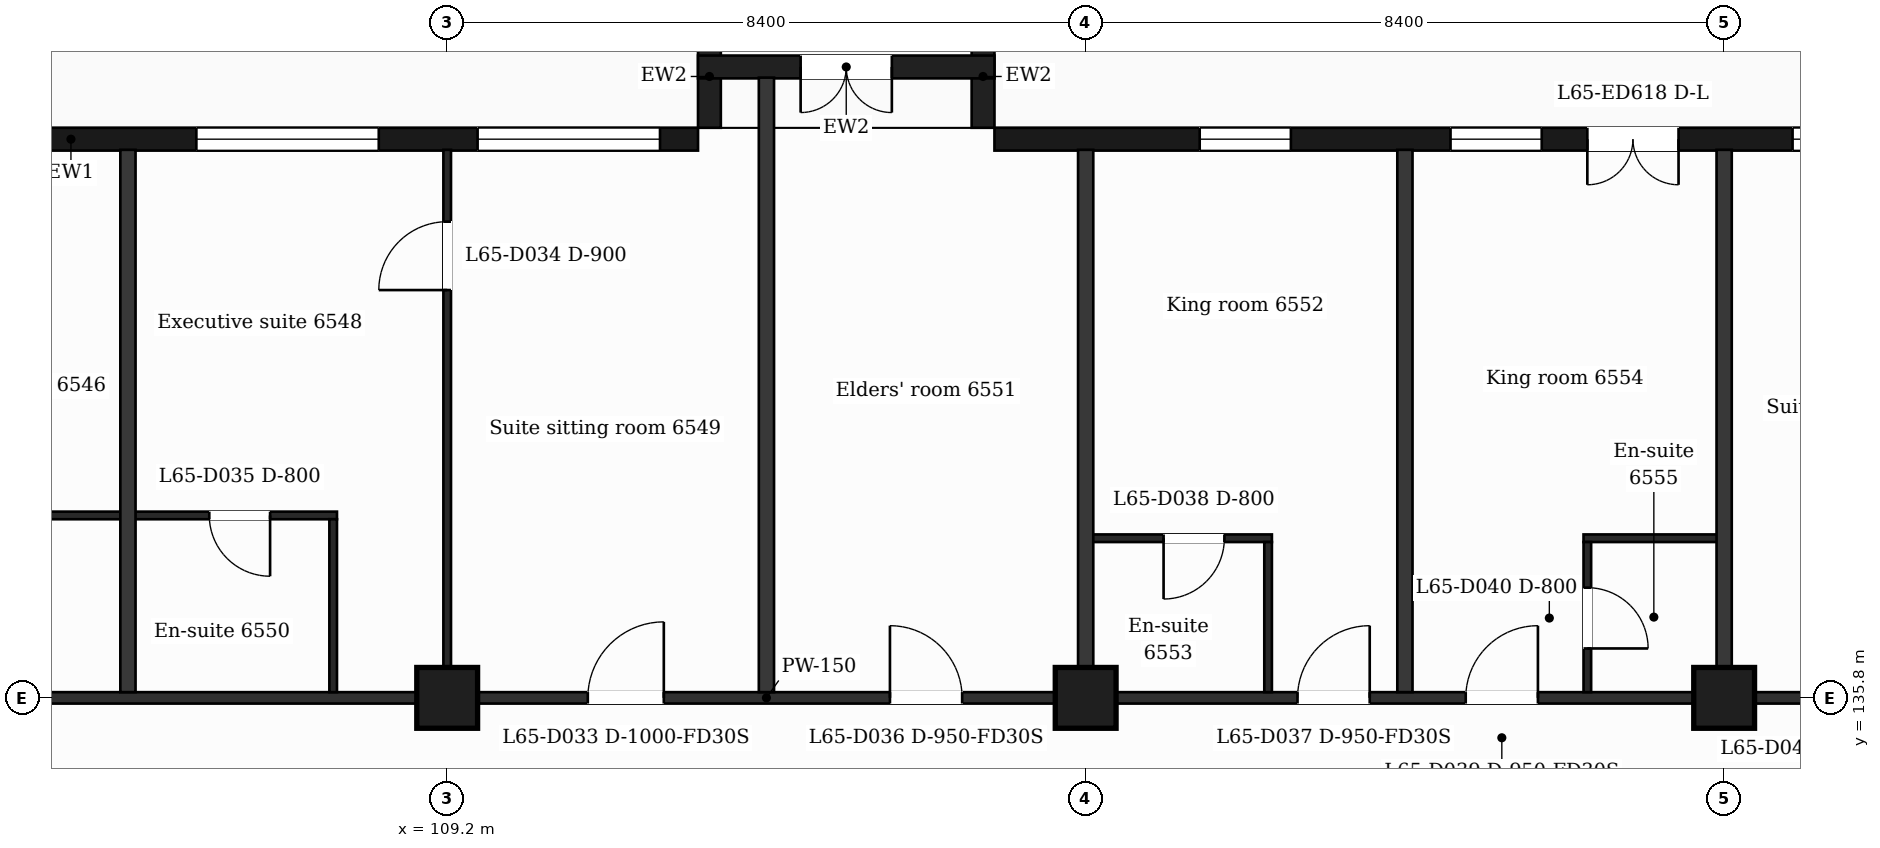
"""IFC4 building model, lengths in metres.
Left out: names, types, materials, properties, quantities, classifications, styles, units other than length and angle.
Written with IfcOpenShell. Run it as: python <this file> out.ifc"""

import sys

from ifc_helpers import new_model, si_unit, direction, frame, frame_2d, origin, origin_2d, place, context, subcontext, project, spatial, rectangle, extrude, element, fill, save


model = new_model("IFC4")
c1 = context("Model", 3, precision=1e-05, world=origin(), true_north=direction((0.0, 1.0)))
c2 = subcontext(c1, "Body", "Model", "MODEL_VIEW")
j1 = project(units=[si_unit("LENGTHUNIT", "METRE"), si_unit("PLANEANGLEUNIT", "RADIAN")], contexts=[c1])
p1 = place(None, origin())
s1 = spatial("IfcSite", under=j1, at=p1, CompositionType="ELEMENT")
p2 = place(p1, origin())
s2 = spatial("IfcBuilding", under=s1, at=p2, CompositionType="ELEMENT")
p3 = place(p2, frame((0.0, 0.0, 270.1)))
s3 = spatial("IfcBuildingStorey", under=s2, at=p3, CompositionType="ELEMENT", Elevation=270.1)
for number, where, z_axis, x_axis in (
    (1, (109.2, 135.8, 0.0), (0.0, 0.0, 1.0), (1.0, 0.0, 0.0)),
    (2, (117.6, 135.8, 0.0), (0.0, 0.0, 1.0), (1.0, 0.0, 0.0)),
    (3, (126.0, 135.8, 0.0), (0.0, 0.0, 1.0), (1.0, 0.0, 0.0)),
):
    element("IfcColumn", number, at=place(p3, frame(where, z_axis=z_axis, x_axis=x_axis)), inside=s3, PredefinedType="COLUMN", context=c2, shape_type="SweptSolid", body=[
        extrude(rectangle(XDim=0.8, YDim=0.8, at=origin_2d()), origin(), (0.0, 0.0, 1.0), 3.7),
    ])
p4 = place(p3, frame((130.65, 143.15, 0.0), z_axis=(0.0, 0.0, 1.0), x_axis=(-1.0, 0.0, 0.0)))
e4 = element("IfcWall", 4, at=p4, inside=s3, PredefinedType="SOLIDWALL", context=c2, shape_type="SweptSolid", body=[
    extrude(rectangle(XDim=14.25, YDim=0.3, at=frame_2d((7.125, 0.0))), origin(), (0.0, 0.0, 1.0), 3.38),
])
p5 = place(p4, frame((1.35, 0.0, 0.9)))
e5 = element("IfcOpeningElement", 5, at=p5, cuts=e4, PredefinedType="OPENING", context=c2, shape_type="SweptSolid", body=[
    extrude(rectangle(XDim=2.4, YDim=2.1, at=frame_2d((1.2, 1.05))), frame((0.0, 0.16, 0.0), z_axis=(0.0, -1.0, 0.0), x_axis=(1.0, 0.0, 0.0)), (0.0, 0.0, 1.0), 0.32),
])
p6 = place(p4, frame((5.25, 0.0, 0.0)))
e6 = element("IfcOpeningElement", 6, at=p6, cuts=e4, PredefinedType="OPENING", context=c2, shape_type="SweptSolid", body=[
    extrude(rectangle(XDim=1.2, YDim=2.4, at=frame_2d((0.6, 1.2))), frame((0.0, 0.16, 0.0), z_axis=(0.0, -1.0, 0.0), x_axis=(1.0, 0.0, 0.0)), (0.0, 0.0, 1.0), 0.32),
])
p7 = place(p4, frame((7.05, 0.0, 0.9)))
e7 = element("IfcOpeningElement", 7, at=p7, cuts=e4, PredefinedType="OPENING", context=c2, shape_type="SweptSolid", body=[
    extrude(rectangle(XDim=1.2, YDim=2.1, at=frame_2d((0.6, 1.05))), frame((0.0, 0.16, 0.0), z_axis=(0.0, -1.0, 0.0), x_axis=(1.0, 0.0, 0.0)), (0.0, 0.0, 1.0), 0.32),
])
p8 = place(p4, frame((10.35, 0.0, 0.9)))
e8 = element("IfcOpeningElement", 8, at=p8, cuts=e4, PredefinedType="OPENING", context=c2, shape_type="SweptSolid", body=[
    extrude(rectangle(XDim=1.2, YDim=2.1, at=frame_2d((0.6, 1.05))), frame((0.0, 0.16, 0.0), z_axis=(0.0, -1.0, 0.0), x_axis=(1.0, 0.0, 0.0)), (0.0, 0.0, 1.0), 0.32),
])
p9 = place(p3, frame((112.5, 143.15, 0.0), z_axis=(0.0, 0.0, 1.0), x_axis=(-1.0, 0.0, 0.0)))
e9 = element("IfcWall", 9, at=p9, inside=s3, PredefinedType="SOLIDWALL", context=c2, shape_type="SweptSolid", body=[
    extrude(rectangle(XDim=16.5, YDim=0.3, at=frame_2d((8.25, 0.0))), origin(), (0.0, 0.0, 1.0), 3.38),
])
p10 = place(p9, frame((0.5, 0.0, 0.9)))
e10 = element("IfcOpeningElement", 10, at=p10, cuts=e9, PredefinedType="OPENING", context=c2, shape_type="SweptSolid", body=[
    extrude(rectangle(XDim=2.4, YDim=2.1, at=frame_2d((1.2, 1.05))), frame((0.0, 0.16, 0.0), z_axis=(0.0, -1.0, 0.0), x_axis=(1.0, 0.0, 0.0)), (0.0, 0.0, 1.0), 0.32),
])
p11 = place(p9, frame((4.2, 0.0, 0.9)))
e11 = element("IfcOpeningElement", 11, at=p11, cuts=e9, PredefinedType="OPENING", context=c2, shape_type="SweptSolid", body=[
    extrude(rectangle(XDim=2.4, YDim=2.1, at=frame_2d((1.2, 1.05))), frame((0.0, 0.16, 0.0), z_axis=(0.0, -1.0, 0.0), x_axis=(1.0, 0.0, 0.0)), (0.0, 0.0, 1.0), 0.32),
])
p12 = place(p9, frame((9.0, 0.0, 0.0)))
e12 = element("IfcOpeningElement", 12, at=p12, cuts=e9, PredefinedType="OPENING", context=c2, shape_type="SweptSolid", body=[
    extrude(rectangle(XDim=1.2, YDim=2.4, at=frame_2d((0.6, 1.2))), frame((0.0, 0.16, 0.0), z_axis=(0.0, -1.0, 0.0), x_axis=(1.0, 0.0, 0.0)), (0.0, 0.0, 1.0), 0.32),
])
p13 = place(p9, frame((12.6, 0.0, 0.9)))
e13 = element("IfcOpeningElement", 13, at=p13, cuts=e9, PredefinedType="OPENING", context=c2, shape_type="SweptSolid", body=[
    extrude(rectangle(XDim=2.4, YDim=2.1, at=frame_2d((1.2, 1.05))), frame((0.0, 0.16, 0.0), z_axis=(0.0, -1.0, 0.0), x_axis=(1.0, 0.0, 0.0)), (0.0, 0.0, 1.0), 0.32),
])
for number, where, z_axis, x_axis in (
    (14, (116.25, 143.3, 0.0), (0.0, 0.0, 1.0), (0.0, 1.0, 0.0)),
    (15, (112.65, 143.3, 0.0), (0.0, 0.0, 1.0), (0.0, 1.0, 0.0)),
):
    element("IfcWall", number, at=place(p3, frame(where, z_axis=z_axis, x_axis=x_axis)), inside=s3, PredefinedType="SOLIDWALL", context=c2, shape_type="SweptSolid", body=[
        extrude(rectangle(XDim=1.35, YDim=0.3, at=frame_2d((0.675, 0.0))), origin(), (0.0, 0.0, 1.0), 3.38),
    ])
p14 = place(p3, frame((116.4, 144.1, 0.0), z_axis=(0.0, 0.0, 1.0), x_axis=(-1.0, 0.0, 0.0)))
e16 = element("IfcWall", 16, at=p14, inside=s3, PredefinedType="SOLIDWALL", context=c2, shape_type="SweptSolid", body=[
    extrude(rectangle(XDim=3.9, YDim=0.3, at=frame_2d((1.95, 0.0))), origin(), (0.0, 0.0, 1.0), 3.38),
])
p15 = place(p14, frame((1.35, 0.0, 0.0)))
e17 = element("IfcOpeningElement", 17, at=p15, cuts=e16, PredefinedType="OPENING", context=c2, shape_type="SweptSolid", body=[
    extrude(rectangle(XDim=1.2, YDim=2.4, at=frame_2d((0.6, 1.2))), frame((0.0, 0.16, 0.0), z_axis=(0.0, -1.0, 0.0), x_axis=(1.0, 0.0, 0.0)), (0.0, 0.0, 1.0), 0.32),
])
p16 = place(p3, frame((90.895, 135.8, 0.0), z_axis=(0.0, 0.0, 1.0), x_axis=(1.0, 0.0, 0.0)))
e18 = element("IfcWall", 18, at=p16, inside=s3, PredefinedType="PARTITIONING", context=c2, shape_type="SweptSolid", body=[
    extrude(rectangle(XDim=45.011, YDim=0.15, at=frame_2d((22.505, 0.0))), origin(), (0.0, 0.0, 1.0), 3.38),
])
p17 = place(p16, frame((8.005, 0.0, 0.0)))
e19 = element("IfcOpeningElement", 19, at=p17, cuts=e18, PredefinedType="OPENING", context=c2, shape_type="SweptSolid", body=[
    extrude(rectangle(XDim=1.0, YDim=2.1, at=frame_2d((0.5, 1.05))), frame((0.0, 0.085, 0.0), z_axis=(0.0, -1.0, 0.0), x_axis=(1.0, 0.0, 0.0)), (0.0, 0.0, 1.0), 0.17),
])
p18 = place(p16, frame((10.515, 0.0, 0.0)))
e20 = element("IfcOpeningElement", 20, at=p18, cuts=e18, PredefinedType="OPENING", context=c2, shape_type="SweptSolid", body=[
    extrude(rectangle(XDim=1.0, YDim=2.1, at=frame_2d((0.5, 1.05))), frame((0.0, 0.085, 0.0), z_axis=(0.0, -1.0, 0.0), x_axis=(1.0, 0.0, 0.0)), (0.0, 0.0, 1.0), 0.17),
])
p19 = place(p16, frame((20.156, 0.0, 0.0)))
e21 = element("IfcOpeningElement", 21, at=p19, cuts=e18, PredefinedType="OPENING", context=c2, shape_type="SweptSolid", body=[
    extrude(rectangle(XDim=1.0, YDim=2.1, at=frame_2d((0.5, 1.05))), frame((0.0, 0.085, 0.0), z_axis=(0.0, -1.0, 0.0), x_axis=(1.0, 0.0, 0.0)), (0.0, 0.0, 1.0), 0.17),
])
p20 = place(p16, frame((24.13, 0.0, 0.0)))
e22 = element("IfcOpeningElement", 22, at=p20, cuts=e18, PredefinedType="OPENING", context=c2, shape_type="SweptSolid", body=[
    extrude(rectangle(XDim=0.95, YDim=2.1, at=frame_2d((0.475, 1.05))), frame((0.0, 0.085, 0.0), z_axis=(0.0, -1.0, 0.0), x_axis=(1.0, 0.0, 0.0)), (0.0, 0.0, 1.0), 0.17),
])
p21 = place(p16, frame((29.492, 0.0, 0.0)))
e23 = element("IfcOpeningElement", 23, at=p21, cuts=e18, PredefinedType="OPENING", context=c2, shape_type="SweptSolid", body=[
    extrude(rectangle(XDim=0.95, YDim=2.1, at=frame_2d((0.475, 1.05))), frame((0.0, 0.085, 0.0), z_axis=(0.0, -1.0, 0.0), x_axis=(1.0, 0.0, 0.0)), (0.0, 0.0, 1.0), 0.17),
])
p22 = place(p16, frame((31.705, 0.0, 0.0)))
e24 = element("IfcOpeningElement", 24, at=p22, cuts=e18, PredefinedType="OPENING", context=c2, shape_type="SweptSolid", body=[
    extrude(rectangle(XDim=0.95, YDim=2.1, at=frame_2d((0.475, 1.05))), frame((0.0, 0.085, 0.0), z_axis=(0.0, -1.0, 0.0), x_axis=(1.0, 0.0, 0.0)), (0.0, 0.0, 1.0), 0.17),
])
p23 = place(p16, frame((36.18, 0.0, 0.0)))
e25 = element("IfcOpeningElement", 25, at=p23, cuts=e18, PredefinedType="OPENING", context=c2, shape_type="SweptSolid", body=[
    extrude(rectangle(XDim=1.0, YDim=2.1, at=frame_2d((0.5, 1.05))), frame((0.0, 0.085, 0.0), z_axis=(0.0, -1.0, 0.0), x_axis=(1.0, 0.0, 0.0)), (0.0, 0.0, 1.0), 0.17),
])
p24 = place(p3, frame((117.6, 137.9, 0.0), z_axis=(0.0, 0.0, 1.0), x_axis=(1.0, 0.0, 0.0)))
e26 = element("IfcWall", 26, at=p24, inside=s3, PredefinedType="PARTITIONING", context=c2, shape_type="SweptSolid", body=[
    extrude(rectangle(XDim=2.45, YDim=0.1, at=frame_2d((1.225, 0.0))), origin(), (0.0, 0.0, 1.0), 3.38),
])
p25 = place(p24, frame((1.025, 0.0, 0.0)))
e27 = element("IfcOpeningElement", 27, at=p25, cuts=e26, PredefinedType="OPENING", context=c2, shape_type="SweptSolid", body=[
    extrude(rectangle(XDim=0.8, YDim=2.1, at=frame_2d((0.4, 1.05))), frame((0.0, 0.06, 0.0), z_axis=(0.0, -1.0, 0.0), x_axis=(1.0, 0.0, 0.0)), (0.0, 0.0, 1.0), 0.12),
])
p26 = place(p3, frame((124.15, 137.9, 0.0), z_axis=(0.0, 0.0, 1.0), x_axis=(1.0, 0.0, 0.0)))
e28 = element("IfcWall", 28, at=p26, inside=s3, PredefinedType="PARTITIONING", context=c2, shape_type="SweptSolid", body=[
    extrude(rectangle(XDim=1.85, YDim=0.1, at=frame_2d((0.925, 0.0))), origin(), (0.0, 0.0, 1.0), 3.38),
])
p27 = place(p3, frame((102.85, 138.2, 0.0), z_axis=(0.0, 0.0, 1.0), x_axis=(1.0, 0.0, 0.0)))
e29 = element("IfcWall", 29, at=p27, inside=s3, PredefinedType="PARTITIONING", context=c2, shape_type="SweptSolid", body=[
    extrude(rectangle(XDim=4.9, YDim=0.1, at=frame_2d((2.45, 0.0))), origin(), (0.0, 0.0, 1.0), 3.38),
])
p28 = place(p27, frame((3.22, 0.0, 0.0)))
e30 = element("IfcOpeningElement", 30, at=p28, cuts=e29, PredefinedType="OPENING", context=c2, shape_type="SweptSolid", body=[
    extrude(rectangle(XDim=0.8, YDim=2.1, at=frame_2d((0.4, 1.05))), frame((0.0, 0.06, 0.0), z_axis=(0.0, -1.0, 0.0), x_axis=(1.0, 0.0, 0.0)), (0.0, 0.0, 1.0), 0.12),
])
p29 = place(p3, frame((105.0, 135.875, 0.0), z_axis=(0.0, 0.0, 1.0), x_axis=(0.0, 1.0, 0.0)))
e31 = element("IfcWall", 31, at=p29, inside=s3, PredefinedType="PARTITIONING", context=c2, shape_type="SweptSolid", body=[
    extrude(rectangle(XDim=7.135, YDim=0.2, at=frame_2d((3.567, 0.0))), origin(), (0.0, 0.0, 1.0), 3.38),
])
p30 = place(p3, frame((107.7, 135.875, 0.0), z_axis=(0.0, 0.0, 1.0), x_axis=(0.0, 1.0, 0.0)))
e32 = element("IfcWall", 32, at=p30, inside=s3, PredefinedType="PARTITIONING", context=c2, shape_type="SweptSolid", body=[
    extrude(rectangle(XDim=2.275, YDim=0.1, at=frame_2d((1.137, 0.0))), origin(), (0.0, 0.0, 1.0), 3.38),
])
p31 = place(p3, frame((109.2, 135.875, 0.0), z_axis=(0.0, 0.0, 1.0), x_axis=(0.0, 1.0, 0.0)))
e33 = element("IfcWall", 33, at=p31, inside=s3, PredefinedType="PARTITIONING", context=c2, shape_type="SweptSolid", body=[
    extrude(rectangle(XDim=7.135, YDim=0.1, at=frame_2d((3.567, 0.0))), origin(), (0.0, 0.0, 1.0), 3.38),
])
p32 = place(p31, frame((5.29, 0.0, 0.0)))
e34 = element("IfcOpeningElement", 34, at=p32, cuts=e33, PredefinedType="OPENING", context=c2, shape_type="SweptSolid", body=[
    extrude(rectangle(XDim=0.9, YDim=2.1, at=frame_2d((0.45, 1.05))), frame((0.0, 0.06, 0.0), z_axis=(0.0, -1.0, 0.0), x_axis=(1.0, 0.0, 0.0)), (0.0, 0.0, 1.0), 0.12),
])
p33 = place(p3, frame((113.4, 135.875, 0.0), z_axis=(0.0, 0.0, 1.0), x_axis=(0.0, 1.0, 0.0)))
e35 = element("IfcWall", 35, at=p33, inside=s3, PredefinedType="PARTITIONING", context=c2, shape_type="SweptSolid", body=[
    extrude(rectangle(XDim=8.085, YDim=0.2, at=frame_2d((4.042, 0.0))), origin(), (0.0, 0.0, 1.0), 3.38),
])
p34 = place(p3, frame((117.6, 135.875, 0.0), z_axis=(0.0, 0.0, 1.0), x_axis=(0.0, 1.0, 0.0)))
e36 = element("IfcWall", 36, at=p34, inside=s3, PredefinedType="PARTITIONING", context=c2, shape_type="SweptSolid", body=[
    extrude(rectangle(XDim=7.135, YDim=0.2, at=frame_2d((3.567, 0.0))), origin(), (0.0, 0.0, 1.0), 3.38),
])
p35 = place(p3, frame((120.0, 135.875, 0.0), z_axis=(0.0, 0.0, 1.0), x_axis=(0.0, 1.0, 0.0)))
e37 = element("IfcWall", 37, at=p35, inside=s3, PredefinedType="PARTITIONING", context=c2, shape_type="SweptSolid", body=[
    extrude(rectangle(XDim=1.975, YDim=0.1, at=frame_2d((0.988, 0.0))), origin(), (0.0, 0.0, 1.0), 3.38),
])
p36 = place(p3, frame((121.8, 135.875, 0.0), z_axis=(0.0, 0.0, 1.0), x_axis=(0.0, 1.0, 0.0)))
e38 = element("IfcWall", 38, at=p36, inside=s3, PredefinedType="PARTITIONING", context=c2, shape_type="SweptSolid", body=[
    extrude(rectangle(XDim=7.135, YDim=0.2, at=frame_2d((3.567, 0.0))), origin(), (0.0, 0.0, 1.0), 3.38),
])
p37 = place(p3, frame((124.2, 135.875, 0.0), z_axis=(0.0, 0.0, 1.0), x_axis=(0.0, 1.0, 0.0)))
e39 = element("IfcWall", 39, at=p37, inside=s3, PredefinedType="PARTITIONING", context=c2, shape_type="SweptSolid", body=[
    extrude(rectangle(XDim=1.975, YDim=0.1, at=frame_2d((0.988, 0.0))), origin(), (0.0, 0.0, 1.0), 3.38),
])
p38 = place(p37, frame((0.575, 0.0, 0.0)))
e40 = element("IfcOpeningElement", 40, at=p38, cuts=e39, PredefinedType="OPENING", context=c2, shape_type="SweptSolid", body=[
    extrude(rectangle(XDim=0.8, YDim=2.1, at=frame_2d((0.4, 1.05))), frame((0.0, 0.06, 0.0), z_axis=(0.0, -1.0, 0.0), x_axis=(1.0, 0.0, 0.0)), (0.0, 0.0, 1.0), 0.12),
])
p39 = place(p3, frame((126.0, 135.875, 0.0), z_axis=(0.0, 0.0, 1.0), x_axis=(0.0, 1.0, 0.0)))
e41 = element("IfcWall", 41, at=p39, inside=s3, PredefinedType="PARTITIONING", context=c2, shape_type="SweptSolid", body=[
    extrude(rectangle(XDim=7.135, YDim=0.2, at=frame_2d((3.567, 0.0))), origin(), (0.0, 0.0, 1.0), 3.38),
])
p40 = place(p5, origin())
e42 = element("IfcWindow", 42, at=p40, inside=s3, PartitioningType="SINGLE_PANEL", PredefinedType="WINDOW", context=c2, shape_type="SweptSolid", body=[
    extrude(rectangle(XDim=2.4, YDim=2.1, at=frame_2d((1.2, 1.05))), frame((0.0, 0.03, 0.0), z_axis=(0.0, -1.0, 0.0), x_axis=(1.0, 0.0, 0.0)), (0.0, 0.0, 1.0), 0.06),
])
fill(e5, e42)
p41 = place(p6, origin())
e43 = element("IfcDoor", 43, at=p41, inside=s3, OperationType="DOUBLE_DOOR_SINGLE_SWING", PredefinedType="DOOR", context=c2, shape_type="SweptSolid", body=[
    extrude(rectangle(XDim=1.2, YDim=2.4, at=frame_2d((0.6, 1.2))), frame((0.0, 0.025, 0.0), z_axis=(0.0, -1.0, 0.0), x_axis=(1.0, 0.0, 0.0)), (0.0, 0.0, 1.0), 0.05),
])
fill(e6, e43)
p42 = place(p7, origin())
e44 = element("IfcWindow", 44, at=p42, inside=s3, PartitioningType="SINGLE_PANEL", PredefinedType="WINDOW", context=c2, shape_type="SweptSolid", body=[
    extrude(rectangle(XDim=1.2, YDim=2.1, at=frame_2d((0.6, 1.05))), frame((0.0, 0.03, 0.0), z_axis=(0.0, -1.0, 0.0), x_axis=(1.0, 0.0, 0.0)), (0.0, 0.0, 1.0), 0.06),
])
fill(e7, e44)
p43 = place(p8, origin())
e45 = element("IfcWindow", 45, at=p43, inside=s3, PartitioningType="SINGLE_PANEL", PredefinedType="WINDOW", context=c2, shape_type="SweptSolid", body=[
    extrude(rectangle(XDim=1.2, YDim=2.1, at=frame_2d((0.6, 1.05))), frame((0.0, 0.03, 0.0), z_axis=(0.0, -1.0, 0.0), x_axis=(1.0, 0.0, 0.0)), (0.0, 0.0, 1.0), 0.06),
])
fill(e8, e45)
p44 = place(p10, origin())
e46 = element("IfcWindow", 46, at=p44, inside=s3, PartitioningType="SINGLE_PANEL", PredefinedType="WINDOW", context=c2, shape_type="SweptSolid", body=[
    extrude(rectangle(XDim=2.4, YDim=2.1, at=frame_2d((1.2, 1.05))), frame((0.0, 0.03, 0.0), z_axis=(0.0, -1.0, 0.0), x_axis=(1.0, 0.0, 0.0)), (0.0, 0.0, 1.0), 0.06),
])
fill(e10, e46)
p45 = place(p11, origin())
e47 = element("IfcWindow", 47, at=p45, inside=s3, PartitioningType="SINGLE_PANEL", PredefinedType="WINDOW", context=c2, shape_type="SweptSolid", body=[
    extrude(rectangle(XDim=2.4, YDim=2.1, at=frame_2d((1.2, 1.05))), frame((0.0, 0.03, 0.0), z_axis=(0.0, -1.0, 0.0), x_axis=(1.0, 0.0, 0.0)), (0.0, 0.0, 1.0), 0.06),
])
fill(e11, e47)
p46 = place(p15, origin())
e48 = element("IfcDoor", 48, at=p46, inside=s3, OperationType="DOUBLE_DOOR_SINGLE_SWING", PredefinedType="DOOR", context=c2, shape_type="SweptSolid", body=[
    extrude(rectangle(XDim=1.2, YDim=2.4, at=frame_2d((0.6, 1.2))), frame((0.0, 0.025, 0.0), z_axis=(0.0, -1.0, 0.0), x_axis=(1.0, 0.0, 0.0)), (0.0, 0.0, 1.0), 0.05),
])
fill(e17, e48)
p47 = place(p19, origin())
e49 = element("IfcDoor", 49, at=p47, inside=s3, OperationType="SINGLE_SWING_RIGHT", PredefinedType="DOOR", context=c2, shape_type="SweptSolid", body=[
    extrude(rectangle(XDim=1.0, YDim=2.1, at=frame_2d((0.5, 1.05))), frame((0.0, 0.025, 0.0), z_axis=(0.0, -1.0, 0.0), x_axis=(1.0, 0.0, 0.0)), (0.0, 0.0, 1.0), 0.05),
])
fill(e21, e49)
p48 = place(p32, origin())
e50 = element("IfcDoor", 50, at=p48, inside=s3, OperationType="SINGLE_SWING_LEFT", PredefinedType="DOOR", context=c2, shape_type="SweptSolid", body=[
    extrude(rectangle(XDim=0.9, YDim=2.1, at=frame_2d((0.45, 1.05))), frame((0.0, 0.025, 0.0), z_axis=(0.0, -1.0, 0.0), x_axis=(1.0, 0.0, 0.0)), (0.0, 0.0, 1.0), 0.05),
])
fill(e34, e50)
p49 = place(p28, origin())
e51 = element("IfcDoor", 51, at=p49, inside=s3, OperationType="SINGLE_SWING_RIGHT", PredefinedType="DOOR", context=c2, shape_type="SweptSolid", body=[
    extrude(rectangle(XDim=0.8, YDim=2.1, at=frame_2d((0.4, 1.05))), frame((0.0, 0.025, 0.0), z_axis=(0.0, -1.0, 0.0), x_axis=(1.0, 0.0, 0.0)), (0.0, 0.0, 1.0), 0.05),
])
fill(e30, e51)
p50 = place(p20, origin())
e52 = element("IfcDoor", 52, at=p50, inside=s3, OperationType="SINGLE_SWING_LEFT", PredefinedType="DOOR", context=c2, shape_type="SweptSolid", body=[
    extrude(rectangle(XDim=0.95, YDim=2.1, at=frame_2d((0.475, 1.05))), frame((0.0, 0.025, 0.0), z_axis=(0.0, -1.0, 0.0), x_axis=(1.0, 0.0, 0.0)), (0.0, 0.0, 1.0), 0.05),
])
fill(e22, e52)
p51 = place(p21, origin())
e53 = element("IfcDoor", 53, at=p51, inside=s3, OperationType="SINGLE_SWING_RIGHT", PredefinedType="DOOR", context=c2, shape_type="SweptSolid", body=[
    extrude(rectangle(XDim=0.95, YDim=2.1, at=frame_2d((0.475, 1.05))), frame((0.0, 0.025, 0.0), z_axis=(0.0, -1.0, 0.0), x_axis=(1.0, 0.0, 0.0)), (0.0, 0.0, 1.0), 0.05),
])
fill(e23, e53)
p52 = place(p25, origin())
e54 = element("IfcDoor", 54, at=p52, inside=s3, OperationType="SINGLE_SWING_LEFT", PredefinedType="DOOR", context=c2, shape_type="SweptSolid", body=[
    extrude(rectangle(XDim=0.8, YDim=2.1, at=frame_2d((0.4, 1.05))), frame((0.0, 0.025, 0.0), z_axis=(0.0, -1.0, 0.0), x_axis=(1.0, 0.0, 0.0)), (0.0, 0.0, 1.0), 0.05),
])
fill(e27, e54)
p53 = place(p22, origin())
e55 = element("IfcDoor", 55, at=p53, inside=s3, OperationType="SINGLE_SWING_RIGHT", PredefinedType="DOOR", context=c2, shape_type="SweptSolid", body=[
    extrude(rectangle(XDim=0.95, YDim=2.1, at=frame_2d((0.475, 1.05))), frame((0.0, 0.025, 0.0), z_axis=(0.0, -1.0, 0.0), x_axis=(1.0, 0.0, 0.0)), (0.0, 0.0, 1.0), 0.05),
])
fill(e24, e55)
p54 = place(p38, origin())
e56 = element("IfcDoor", 56, at=p54, inside=s3, OperationType="SINGLE_SWING_LEFT", PredefinedType="DOOR", context=c2, shape_type="SweptSolid", body=[
    extrude(rectangle(XDim=0.8, YDim=2.1, at=frame_2d((0.4, 1.05))), frame((0.0, 0.025, 0.0), z_axis=(0.0, -1.0, 0.0), x_axis=(1.0, 0.0, 0.0)), (0.0, 0.0, 1.0), 0.05),
])
fill(e40, e56)
save(model, sys.argv[1])
